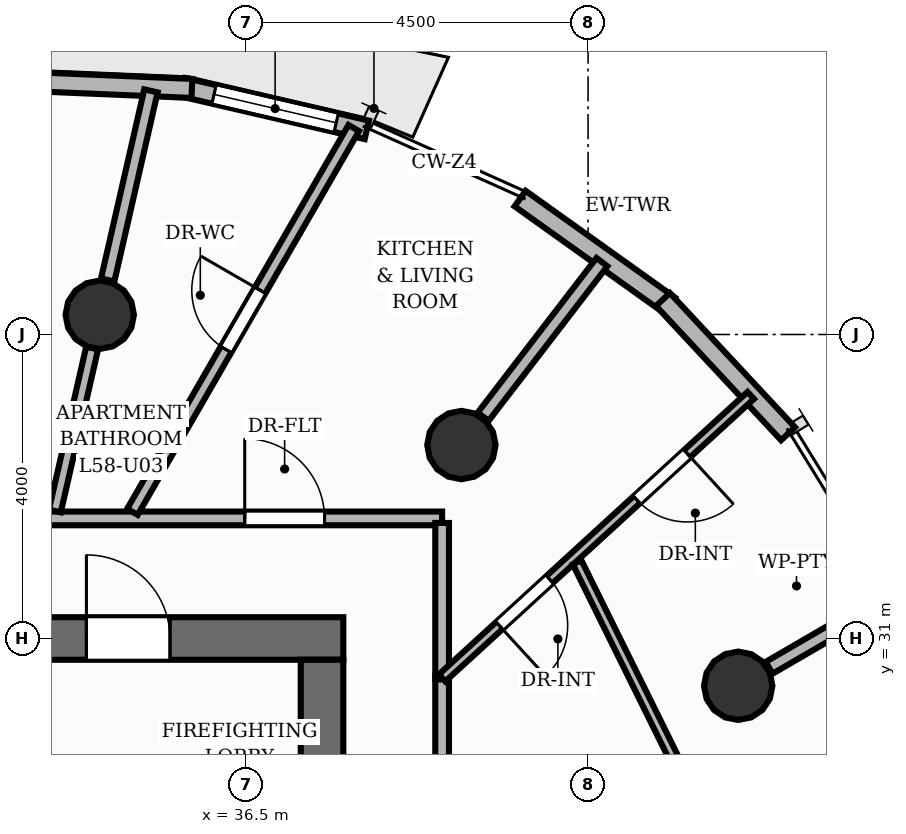
"""IFC4 building model, lengths in metres.
Left out: names, types, materials, properties, quantities, classifications, styles, units other than length and angle.
Written with IfcOpenShell. Run it as: python <this file> out.ifc"""

import sys

from ifc_helpers import new_model, si_unit, direction, frame, frame_2d, origin, origin_2d, place, context, subcontext, project, spatial, rectangle, circle, extrude, element, fill, save


model = new_model("IFC4")
c1 = context("Model", 3, precision=1e-05, world=origin(), true_north=direction((0.0, 1.0)))
c2 = subcontext(c1, "Body", "Model", "MODEL_VIEW")
j1 = project(units=[si_unit("LENGTHUNIT", "METRE"), si_unit("PLANEANGLEUNIT", "RADIAN")], contexts=[c1])
p1 = place(None, origin())
s1 = spatial("IfcSite", under=j1, at=p1, CompositionType="ELEMENT")
p2 = place(p1, origin())
s2 = spatial("IfcBuilding", under=s1, at=p2, CompositionType="ELEMENT")
p3 = place(p2, frame((0.0, 0.0, 195.04)))
s3 = spatial("IfcBuildingStorey", under=s2, at=p3, CompositionType="ELEMENT", Elevation=195.04)
p4 = place(p3, frame((26.22, 31.0, 0.0), z_axis=(0.0, 0.0, 1.0), x_axis=(1.0, 0.0, 0.0)))
e1 = element("IfcWall", 1, at=p4, inside=s3, PredefinedType="SHEAR", context=c2, shape_type="SweptSolid", body=[
    extrude(rectangle(XDim=11.56, YDim=0.56, at=frame_2d((5.78, 0.0))), origin(), (0.0, 0.0, 1.0), 3.2),
])
p5 = place(p4, frame((8.18, 0.0, 0.0)))
e2 = element("IfcOpeningElement", 2, at=p5, cuts=e1, PredefinedType="OPENING", context=c2, shape_type="SweptSolid", body=[
    extrude(rectangle(XDim=1.1, YDim=2.15, at=frame_2d((0.55, 1.075))), frame((0.0, 0.29, 0.0), z_axis=(0.0, -1.0, 0.0), x_axis=(1.0, 0.0, 0.0)), (0.0, 0.0, 1.0), 0.58),
])
p6 = place(p4, frame((0.805, 0.0, 0.0)))
e3 = element("IfcOpeningElement", 3, at=p6, cuts=e1, PredefinedType="OPENING", context=c2, shape_type="SweptSolid", body=[
    extrude(rectangle(XDim=1.05, YDim=2.15, at=frame_2d((0.525, 1.075))), frame((0.0, 0.29, 0.0), z_axis=(0.0, -1.0, 0.0), x_axis=(1.0, 0.0, 0.0)), (0.0, 0.0, 1.0), 0.58),
])
p7 = place(p4, frame((2.555, 0.0, 0.0)))
e4 = element("IfcOpeningElement", 4, at=p7, cuts=e1, PredefinedType="OPENING", context=c2, shape_type="SweptSolid", body=[
    extrude(rectangle(XDim=1.05, YDim=2.15, at=frame_2d((0.525, 1.075))), frame((0.0, 0.29, 0.0), z_axis=(0.0, -1.0, 0.0), x_axis=(1.0, 0.0, 0.0)), (0.0, 0.0, 1.0), 0.58),
])
p8 = place(p4, frame((4.305, 0.0, 0.0)))
e5 = element("IfcOpeningElement", 5, at=p8, cuts=e1, PredefinedType="OPENING", context=c2, shape_type="SweptSolid", body=[
    extrude(rectangle(XDim=1.05, YDim=2.15, at=frame_2d((0.525, 1.075))), frame((0.0, 0.29, 0.0), z_axis=(0.0, -1.0, 0.0), x_axis=(1.0, 0.0, 0.0)), (0.0, 0.0, 1.0), 0.58),
])
p9 = place(p3, frame((37.5, 17.28, 0.0), z_axis=(0.0, 0.0, 1.0), x_axis=(0.0, 1.0, 0.0)))
e6 = element("IfcWall", 6, at=p9, inside=s3, PredefinedType="SHEAR", context=c2, shape_type="SweptSolid", body=[
    extrude(rectangle(XDim=13.44, YDim=0.56, at=frame_2d((6.72, 0.0))), origin(), (0.0, 0.0, 1.0), 3.2),
])
for number, where, z_axis, x_axis in (
    (7, (42.975, 30.378, 0.0), (0.0, 0.0, 1.0), (1.0, 0.0, 0.0)),
    (8, (39.333, 33.545, 0.0), (0.0, 0.0, 1.0), (1.0, 0.0, 0.0)),
    (9, (34.575, 35.26, 0.0), (0.0, 0.0, 1.0), (1.0, 0.0, 0.0)),
):
    element("IfcColumn", number, at=place(p3, frame(where, z_axis=z_axis, x_axis=x_axis)), inside=s3, PredefinedType="COLUMN", context=c2, shape_type="SweptSolid", body=[
        extrude(circle(Radius=0.45, at=origin_2d()), origin(), (0.0, 0.0, 1.0), 3.2),
    ])
p10 = place(p3, frame((40.106, 36.788, 0.0), z_axis=(0.0, 0.0, 1.0), x_axis=(0.813794949485, -0.581152114504, 0.0)))
e10 = element("IfcWall", 10, at=p10, inside=s3, PredefinedType="SOLIDWALL", context=c2, shape_type="SweptSolid", body=[
    extrude(rectangle(XDim=2.415, YDim=0.25, at=frame_2d((1.208, 0.0))), origin(), (0.0, 0.0, 1.0), 2.96),
])
p11 = place(p3, frame((35.676, 38.253, 0.0), z_axis=(0.0, 0.0, 1.0), x_axis=(0.974096425092, -0.226133046286, 0.0)))
e11 = element("IfcWall", 11, at=p11, inside=s3, PredefinedType="SOLIDWALL", context=c2, shape_type="SweptSolid", body=[
    extrude(rectangle(XDim=2.478, YDim=0.25, at=frame_2d((1.239, 0.0))), origin(), (0.0, 0.0, 1.0), 2.96),
])
p12 = place(p11, frame((0.414, 0.0, 0.85)))
e12 = element("IfcOpeningElement", 12, at=p12, cuts=e11, PredefinedType="OPENING", context=c2, shape_type="SweptSolid", body=[
    extrude(rectangle(XDim=1.65, YDim=1.55, at=frame_2d((0.825, 0.775))), frame((0.0, 0.135, 0.0), z_axis=(0.0, -1.0, 0.0), x_axis=(1.0, 0.0, 0.0)), (0.0, 0.0, 1.0), 0.27),
])
p13 = place(p3, frame((33.258, 38.345, 0.0), z_axis=(0.0, 0.0, 1.0), x_axis=(0.999099670747, -0.042424614469, 0.0)))
e13 = element("IfcWall", 13, at=p13, inside=s3, PredefinedType="SOLIDWALL", context=c2, shape_type="SweptSolid", body=[
    extrude(rectangle(XDim=2.532, YDim=0.25, at=frame_2d((1.266, 0.0))), origin(), (0.0, 0.0, 1.0), 2.96),
])
p14 = place(p3, frame((41.985, 35.461, 0.0), z_axis=(0.0, 0.0, 1.0), x_axis=(0.681640731319, -0.731687032417, 0.0)))
e14 = element("IfcWall", 14, at=p14, inside=s3, PredefinedType="SOLIDWALL", context=c2, shape_type="SweptSolid", body=[
    extrude(rectangle(XDim=2.415, YDim=0.25, at=frame_2d((1.208, 0.0))), origin(), (0.0, 0.0, 1.0), 2.96),
])
p15 = place(p3, frame((43.382, 30.614, 0.0), z_axis=(0.0, 0.0, 1.0), x_axis=(0.864618511529, 0.502428929821, 0.0)))
e15 = element("IfcWall", 15, at=p15, inside=s3, PredefinedType="PARTITIONING", context=c2, shape_type="SweptSolid", body=[
    extrude(rectangle(XDim=1.706, YDim=0.18, at=frame_2d((0.853, 0.0))), origin(), (0.0, 0.0, 1.0), 2.403),
])
p16 = place(p3, frame((39.62, 33.918, 0.0), z_axis=(0.0, 0.0, 1.0), x_axis=(0.60921849036, 0.79300241551, 0.0)))
e16 = element("IfcWall", 16, at=p16, inside=s3, PredefinedType="PARTITIONING", context=c2, shape_type="SweptSolid", body=[
    extrude(rectangle(XDim=2.565, YDim=0.18, at=frame_2d((1.283, 0.0))), origin(), (0.0, 0.0, 1.0), 2.403),
])
p17 = place(p3, frame((34.68, 35.718, 0.0), z_axis=(0.0, 0.0, 1.0), x_axis=(0.22299363946, 0.974819899654, 0.0)))
e17 = element("IfcWall", 17, at=p17, inside=s3, PredefinedType="PARTITIONING", context=c2, shape_type="SweptSolid", body=[
    extrude(rectangle(XDim=2.552, YDim=0.18, at=frame_2d((1.276, 0.0))), origin(), (0.0, 0.0, 1.0), 2.403),
])
p18 = place(p3, frame((39.08, 30.508, 0.0), z_axis=(0.0, 0.0, 1.0), x_axis=(0.0, -1.0, 0.0)))
e18 = element("IfcWall", 18, at=p18, inside=s3, PredefinedType="PARTITIONING", context=c2, shape_type="SweptSolid", body=[
    extrude(rectangle(XDim=15.088, YDim=0.18, at=frame_2d((7.544, 0.0))), origin(), (0.0, 0.0, 1.0), 2.955),
])
p19 = place(p18, frame((7.548, 0.0, 0.0)))
e19 = element("IfcOpeningElement", 19, at=p19, cuts=e18, PredefinedType="OPENING", context=c2, shape_type="SweptSolid", body=[
    extrude(rectangle(XDim=1.05, YDim=2.15, at=frame_2d((0.525, 1.075))), frame((0.0, 0.1, 0.0), z_axis=(0.0, -1.0, 0.0), x_axis=(1.0, 0.0, 0.0)), (0.0, 0.0, 1.0), 0.2),
])
p20 = place(p3, frame((24.92, 32.58, 0.0), z_axis=(0.0, 0.0, 1.0), x_axis=(1.0, 0.0, 0.0)))
e20 = element("IfcWall", 20, at=p20, inside=s3, PredefinedType="PARTITIONING", context=c2, shape_type="SweptSolid", body=[
    extrude(rectangle(XDim=14.16, YDim=0.18, at=frame_2d((7.08, 0.0))), origin(), (0.0, 0.0, 1.0), 2.955),
])
p21 = place(p20, frame((11.563, 0.0, 0.0)))
e21 = element("IfcOpeningElement", 21, at=p21, cuts=e20, PredefinedType="OPENING", context=c2, shape_type="SweptSolid", body=[
    extrude(rectangle(XDim=1.05, YDim=2.15, at=frame_2d((0.525, 1.075))), frame((0.0, 0.1, 0.0), z_axis=(0.0, -1.0, 0.0), x_axis=(1.0, 0.0, 0.0)), (0.0, 0.0, 1.0), 0.2),
])
p22 = place(p20, frame((5.684, 0.0, 0.0)))
e22 = element("IfcOpeningElement", 22, at=p22, cuts=e20, PredefinedType="OPENING", context=c2, shape_type="SweptSolid", body=[
    extrude(rectangle(XDim=1.05, YDim=2.15, at=frame_2d((0.525, 1.075))), frame((0.0, 0.1, 0.0), z_axis=(0.0, -1.0, 0.0), x_axis=(1.0, 0.0, 0.0)), (0.0, 0.0, 1.0), 0.2),
])
p23 = place(p3, frame((39.08, 32.52, 0.0), z_axis=(0.0, 0.0, 1.0), x_axis=(0.0, -1.0, 0.0)))
e23 = element("IfcWall", 23, at=p23, inside=s3, PredefinedType="PARTITIONING", context=c2, shape_type="SweptSolid", body=[
    extrude(rectangle(XDim=2.059, YDim=0.18, at=frame_2d((1.029, 0.0))), origin(), (0.0, 0.0, 1.0), 2.955),
])
p24 = place(p3, frame((35.005, 32.667, 0.0), z_axis=(0.0, 0.0, 1.0), x_axis=(0.499495237235, 0.866316632635, 0.0)))
e24 = element("IfcWall", 24, at=p24, inside=s3, PredefinedType="PLUMBINGWALL", context=c2, shape_type="SweptSolid", body=[
    extrude(rectangle(XDim=5.83, YDim=0.16, at=frame_2d((2.915, 0.0))), origin(), (0.0, 0.0, 1.0), 2.692),
])
p25 = place(p24, frame((2.465, 0.0, 0.0)))
e25 = element("IfcOpeningElement", 25, at=p25, cuts=e24, PredefinedType="OPENING", context=c2, shape_type="SweptSolid", body=[
    extrude(rectangle(XDim=0.9, YDim=2.1, at=frame_2d((0.45, 1.05))), frame((0.0, 0.09, 0.0), z_axis=(0.0, -1.0, 0.0), x_axis=(1.0, 0.0, 0.0)), (0.0, 0.0, 1.0), 0.18),
])
p26 = place(p3, frame((43.14, 34.198, 0.0), z_axis=(0.0, 0.0, 1.0), x_axis=(-0.737575567473, -0.675264601668, 0.0)))
e26 = element("IfcWall", 26, at=p26, inside=s3, PredefinedType="PARTITIONING", context=c2, shape_type="SweptSolid", body=[
    extrude(rectangle(XDim=5.505, YDim=0.125, at=frame_2d((2.752, 0.0))), origin(), (0.0, 0.0, 1.0), 2.955),
])
p27 = place(p26, frame((1.133, 0.0, 0.0)))
e27 = element("IfcOpeningElement", 27, at=p27, cuts=e26, PredefinedType="OPENING", context=c2, shape_type="SweptSolid", body=[
    extrude(rectangle(XDim=0.9, YDim=2.1, at=frame_2d((0.45, 1.05))), frame((0.0, 0.073, 0.0), z_axis=(0.0, -1.0, 0.0), x_axis=(1.0, 0.0, 0.0)), (0.0, 0.0, 1.0), 0.145),
])
p28 = place(p26, frame((3.585, 0.0, 0.0)))
e28 = element("IfcOpeningElement", 28, at=p28, cuts=e26, PredefinedType="OPENING", context=c2, shape_type="SweptSolid", body=[
    extrude(rectangle(XDim=0.9, YDim=2.1, at=frame_2d((0.45, 1.05))), frame((0.0, 0.073, 0.0), z_axis=(0.0, -1.0, 0.0), x_axis=(1.0, 0.0, 0.0)), (0.0, 0.0, 1.0), 0.145),
])
p29 = place(p3, frame((33.985, 32.677, 0.0), z_axis=(0.0, 0.0, 1.0), x_axis=(0.222969522248, 0.974825416241, 0.0)))
e29 = element("IfcWall", 29, at=p29, inside=s3, PredefinedType="PLUMBINGWALL", context=c2, shape_type="SweptSolid", body=[
    extrude(rectangle(XDim=2.199, YDim=0.16, at=frame_2d((1.099, 0.0))), origin(), (0.0, 0.0, 1.0), 2.403),
])
p30 = place(p3, frame((43.767, 26.113, 0.0), z_axis=(0.0, 0.0, 1.0), x_axis=(-0.443135854585, 0.89645446866, 0.0)))
e30 = element("IfcWall", 30, at=p30, inside=s3, PredefinedType="PARTITIONING", context=c2, shape_type="SweptSolid", body=[
    extrude(rectangle(XDim=6.569, YDim=0.125, at=frame_2d((3.285, 0.0))), origin(), (0.0, 0.0, 1.0), 2.488),
])
p31 = place(p12, origin())
e31 = element("IfcWindow", 31, at=p31, inside=s3, PartitioningType="SINGLE_PANEL", PredefinedType="WINDOW", context=c2, shape_type="SweptSolid", body=[
    extrude(rectangle(XDim=1.65, YDim=1.55, at=frame_2d((0.825, 0.775))), frame((0.0, 0.03, 0.0), z_axis=(0.0, -1.0, 0.0), x_axis=(1.0, 0.0, 0.0)), (0.0, 0.0, 1.0), 0.06),
])
fill(e12, e31)
p32 = place(p5, origin())
e32 = element("IfcDoor", 32, at=p32, inside=s3, OperationType="SINGLE_SWING_LEFT", PredefinedType="DOOR", context=c2, shape_type="SweptSolid", body=[
    extrude(rectangle(XDim=1.1, YDim=2.15, at=frame_2d((0.55, 1.075))), frame((0.0, 0.025, 0.0), z_axis=(0.0, -1.0, 0.0), x_axis=(1.0, 0.0, 0.0)), (0.0, 0.0, 1.0), 0.05),
])
fill(e2, e32)
p33 = place(p21, origin())
e33 = element("IfcDoor", 33, at=p33, inside=s3, OperationType="SINGLE_SWING_LEFT", PredefinedType="DOOR", context=c2, shape_type="SweptSolid", body=[
    extrude(rectangle(XDim=1.05, YDim=2.15, at=frame_2d((0.525, 1.075))), frame((0.0, 0.025, 0.0), z_axis=(0.0, -1.0, 0.0), x_axis=(1.0, 0.0, 0.0)), (0.0, 0.0, 1.0), 0.05),
])
fill(e21, e33)
p34 = place(p25, origin())
e34 = element("IfcDoor", 34, at=p34, inside=s3, OperationType="SINGLE_SWING_RIGHT", PredefinedType="DOOR", context=c2, shape_type="SweptSolid", body=[
    extrude(rectangle(XDim=0.9, YDim=2.1, at=frame_2d((0.45, 1.05))), frame((0.0, 0.025, 0.0), z_axis=(0.0, -1.0, 0.0), x_axis=(1.0, 0.0, 0.0)), (0.0, 0.0, 1.0), 0.05),
])
fill(e25, e34)
p35 = place(p27, origin())
e35 = element("IfcDoor", 35, at=p35, inside=s3, OperationType="SINGLE_SWING_LEFT", PredefinedType="DOOR", context=c2, shape_type="SweptSolid", body=[
    extrude(rectangle(XDim=0.9, YDim=2.1, at=frame_2d((0.45, 1.05))), frame((0.0, 0.025, 0.0), z_axis=(0.0, -1.0, 0.0), x_axis=(1.0, 0.0, 0.0)), (0.0, 0.0, 1.0), 0.05),
])
fill(e27, e35)
p36 = place(p28, origin())
e36 = element("IfcDoor", 36, at=p36, inside=s3, OperationType="SINGLE_SWING_RIGHT", PredefinedType="DOOR", context=c2, shape_type="SweptSolid", body=[
    extrude(rectangle(XDim=0.9, YDim=2.1, at=frame_2d((0.45, 1.05))), frame((0.0, 0.025, 0.0), z_axis=(0.0, -1.0, 0.0), x_axis=(1.0, 0.0, 0.0)), (0.0, 0.0, 1.0), 0.05),
])
fill(e28, e36)
save(model, sys.argv[1])
